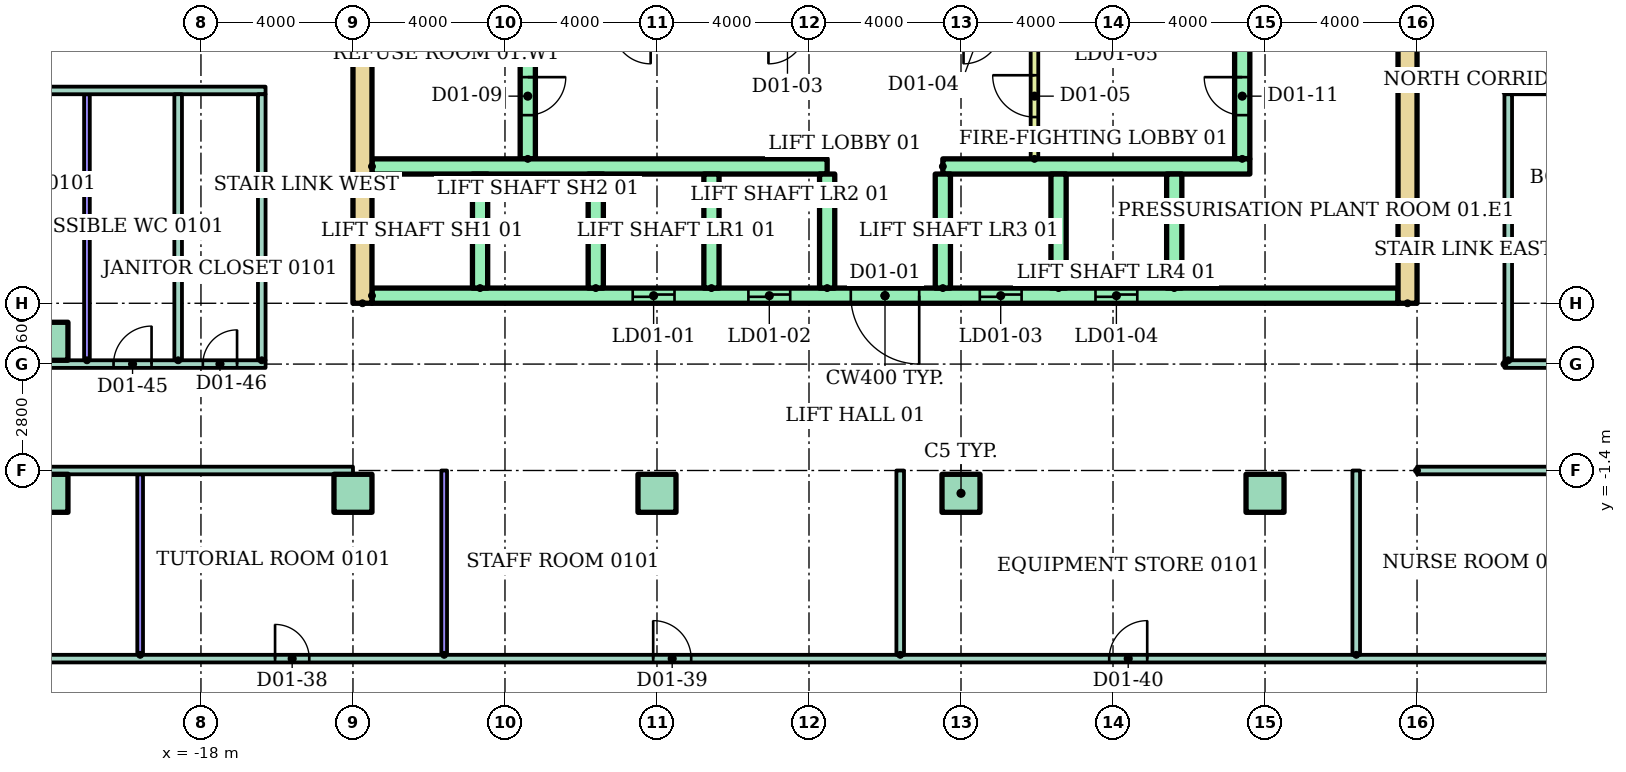
"""IFC4 building model, lengths in metres.
Left out: names, types, materials, properties, quantities, classifications, styles, units other than length and angle.
Written with IfcOpenShell. Run it as: python <this file> out.ifc"""

import sys

from ifc_helpers import new_model, si_unit, direction, frame, frame_2d, origin, origin_2d, place, context, subcontext, project, spatial, rectangle, extrude, element, fill, save


model = new_model("IFC4")
c1 = context("Model", 3, precision=1e-05, world=origin(), true_north=direction((0.0, 1.0)))
c2 = subcontext(c1, "Body", "Model", "MODEL_VIEW")
j1 = project(units=[si_unit("LENGTHUNIT", "METRE"), si_unit("PLANEANGLEUNIT", "RADIAN")], contexts=[c1])
p1 = place(None, origin())
s1 = spatial("IfcSite", under=j1, at=p1, CompositionType="ELEMENT")
p2 = place(p1, origin())
s2 = spatial("IfcBuilding", under=s1, at=p2, CompositionType="ELEMENT")
p3 = place(p2, frame((0.0, 0.0, 6.0)))
s3 = spatial("IfcBuildingStorey", under=s2, at=p3, CompositionType="ELEMENT", Elevation=6.0)
for number, where in (
    (1, (-22.0, -2.0, 0.0)),
    (2, (-14.0, -2.0, 0.0)),
    (3, (-6.0, -2.0, 0.0)),
    (4, (2.0, -2.0, 0.0)),
    (5, (10.0, -2.0, 0.0)),
    (6, (-22.0, 2.0, 0.0)),
):
    element("IfcColumn", number, at=place(p3, frame(where)), inside=s3, PredefinedType="COLUMN", context=c2, shape_type="SweptSolid", body=[
        extrude(rectangle(XDim=1.0, YDim=1.0, at=origin_2d()), origin(), (0.0, 0.0, 1.0), 4.0),
    ])
for number, where, z_axis, x_axis in (
    (7, (-13.75, 3.0, 0.0), (0.0, 0.0, 1.0), (0.0, 1.0, 0.0)),
    (8, (13.75, 3.0, 0.0), (0.0, 0.0, 1.0), (0.0, 1.0, 0.0)),
):
    element("IfcWall", number, at=place(p3, frame(where, z_axis=z_axis, x_axis=x_axis)), inside=s3, PredefinedType="SHEAR", context=c2, shape_type="SweptSolid", body=[
        extrude(rectangle(XDim=17.0, YDim=0.5, at=frame_2d((8.5, 0.0))), origin(), (0.0, 0.0, 1.0), 3.7),
    ])
p4 = place(p3, frame((-9.4, 6.8, 0.0), z_axis=(0.0, 0.0, 1.0), x_axis=(0.0, 1.0, 0.0)))
e9 = element("IfcWall", 9, at=p4, inside=s3, PredefinedType="SHEAR", context=c2, shape_type="SweptSolid", body=[
    extrude(rectangle(XDim=12.7, YDim=0.4, at=frame_2d((6.35, 0.0))), origin(), (0.0, 0.0, 1.0), 3.7),
])
p5 = place(p4, frame((1.15, 0.0, 0.0)))
e10 = element("IfcOpeningElement", 10, at=p5, cuts=e9, PredefinedType="OPENING", context=c2, shape_type="SweptSolid", body=[
    extrude(rectangle(XDim=1.0, YDim=2.1, at=frame_2d((0.5, 1.05))), frame((0.0, 0.21, 0.0), z_axis=(0.0, -1.0, 0.0), x_axis=(1.0, 0.0, 0.0)), (0.0, 0.0, 1.0), 0.42),
])
p6 = place(p4, frame((7.925, 0.0, 0.0)))
e11 = element("IfcOpeningElement", 11, at=p6, cuts=e9, PredefinedType="OPENING", context=c2, shape_type="SweptSolid", body=[
    extrude(rectangle(XDim=1.0, YDim=2.1, at=frame_2d((0.5, 1.05))), frame((0.0, 0.21, 0.0), z_axis=(0.0, -1.0, 0.0), x_axis=(1.0, 0.0, 0.0)), (0.0, 0.0, 1.0), 0.42),
])
p7 = place(p3, frame((9.4, 6.8, 0.0), z_axis=(0.0, 0.0, 1.0), x_axis=(0.0, 1.0, 0.0)))
e12 = element("IfcWall", 12, at=p7, inside=s3, PredefinedType="SHEAR", context=c2, shape_type="SweptSolid", body=[
    extrude(rectangle(XDim=12.7, YDim=0.4, at=frame_2d((6.35, 0.0))), origin(), (0.0, 0.0, 1.0), 3.7),
])
p8 = place(p7, frame((1.15, 0.0, 0.0)))
e13 = element("IfcOpeningElement", 13, at=p8, cuts=e12, PredefinedType="OPENING", context=c2, shape_type="SweptSolid", body=[
    extrude(rectangle(XDim=1.0, YDim=2.1, at=frame_2d((0.5, 1.05))), frame((0.0, 0.21, 0.0), z_axis=(0.0, -1.0, 0.0), x_axis=(1.0, 0.0, 0.0)), (0.0, 0.0, 1.0), 0.42),
])
p9 = place(p7, frame((7.925, 0.0, 0.0)))
e14 = element("IfcOpeningElement", 14, at=p9, cuts=e12, PredefinedType="OPENING", context=c2, shape_type="SweptSolid", body=[
    extrude(rectangle(XDim=1.0, YDim=2.1, at=frame_2d((0.5, 1.05))), frame((0.0, 0.21, 0.0), z_axis=(0.0, -1.0, 0.0), x_axis=(1.0, 0.0, 0.0)), (0.0, 0.0, 1.0), 0.42),
])
p10 = place(p3, frame((-13.5, 3.2, 0.0)))
e15 = element("IfcWall", 15, at=p10, inside=s3, PredefinedType="SHEAR", context=c2, shape_type="SweptSolid", body=[
    extrude(rectangle(XDim=27.0, YDim=0.4, at=frame_2d((13.5, 0.0))), origin(), (0.0, 0.0, 1.0), 3.7),
])
p11 = place(p10, frame((6.861, 0.0, 0.0)))
e16 = element("IfcOpeningElement", 16, at=p11, cuts=e15, PredefinedType="OPENING", context=c2, shape_type="SweptSolid", body=[
    extrude(rectangle(XDim=1.1, YDim=2.1, at=frame_2d((0.55, 1.05))), frame((0.0, 0.21, 0.0), z_axis=(0.0, -1.0, 0.0), x_axis=(1.0, 0.0, 0.0)), (0.0, 0.0, 1.0), 0.42),
])
p12 = place(p10, frame((9.906, 0.0, 0.0)))
e17 = element("IfcOpeningElement", 17, at=p12, cuts=e15, PredefinedType="OPENING", context=c2, shape_type="SweptSolid", body=[
    extrude(rectangle(XDim=1.1, YDim=2.1, at=frame_2d((0.55, 1.05))), frame((0.0, 0.21, 0.0), z_axis=(0.0, -1.0, 0.0), x_axis=(1.0, 0.0, 0.0)), (0.0, 0.0, 1.0), 0.42),
])
p13 = place(p10, frame((15.994, 0.0, 0.0)))
e18 = element("IfcOpeningElement", 18, at=p13, cuts=e15, PredefinedType="OPENING", context=c2, shape_type="SweptSolid", body=[
    extrude(rectangle(XDim=1.1, YDim=2.1, at=frame_2d((0.55, 1.05))), frame((0.0, 0.21, 0.0), z_axis=(0.0, -1.0, 0.0), x_axis=(1.0, 0.0, 0.0)), (0.0, 0.0, 1.0), 0.42),
])
p14 = place(p10, frame((19.039, 0.0, 0.0)))
e19 = element("IfcOpeningElement", 19, at=p14, cuts=e15, PredefinedType="OPENING", context=c2, shape_type="SweptSolid", body=[
    extrude(rectangle(XDim=1.1, YDim=2.1, at=frame_2d((0.55, 1.05))), frame((0.0, 0.21, 0.0), z_axis=(0.0, -1.0, 0.0), x_axis=(1.0, 0.0, 0.0)), (0.0, 0.0, 1.0), 0.42),
])
p15 = place(p10, frame((12.6, 0.0, 0.0)))
e20 = element("IfcOpeningElement", 20, at=p15, cuts=e15, PredefinedType="OPENING", context=c2, shape_type="SweptSolid", body=[
    extrude(rectangle(XDim=1.8, YDim=2.1, at=frame_2d((0.9, 1.05))), frame((0.0, 0.21, 0.0), z_axis=(0.0, -1.0, 0.0), x_axis=(1.0, 0.0, 0.0)), (0.0, 0.0, 1.0), 0.42),
])
p16 = place(p3, frame((-13.5, 6.6, 0.0)))
e21 = element("IfcWall", 21, at=p16, inside=s3, PredefinedType="SHEAR", context=c2, shape_type="SweptSolid", body=[
    extrude(rectangle(XDim=11.978, YDim=0.4, at=frame_2d((5.989, 0.0))), origin(), (0.0, 0.0, 1.0), 3.7),
])
p17 = place(p3, frame((1.522, 6.6, 0.0)))
e22 = element("IfcWall", 22, at=p17, inside=s3, PredefinedType="SHEAR", context=c2, shape_type="SweptSolid", body=[
    extrude(rectangle(XDim=8.078, YDim=0.4, at=frame_2d((4.039, 0.0))), origin(), (0.0, 0.0, 1.0), 3.7),
])
for number, where, z_axis, x_axis in (
    (23, (-10.656, 3.4, 0.0), (0.0, 0.0, 1.0), (0.0, 1.0, 0.0)),
    (24, (-7.611, 3.4, 0.0), (0.0, 0.0, 1.0), (0.0, 1.0, 0.0)),
    (25, (-4.567, 3.4, 0.0), (0.0, 0.0, 1.0), (0.0, 1.0, 0.0)),
    (26, (-1.522, 3.4, 0.0), (0.0, 0.0, 1.0), (0.0, 1.0, 0.0)),
    (27, (1.522, 3.4, 0.0), (0.0, 0.0, 1.0), (0.0, 1.0, 0.0)),
    (28, (4.567, 3.4, 0.0), (0.0, 0.0, 1.0), (0.0, 1.0, 0.0)),
    (29, (7.611, 3.4, 0.0), (0.0, 0.0, 1.0), (0.0, 1.0, 0.0)),
):
    element("IfcWall", number, at=place(p3, frame(where, z_axis=z_axis, x_axis=x_axis)), inside=s3, PredefinedType="SHEAR", context=c2, shape_type="SweptSolid", body=[
        extrude(rectangle(XDim=3.0, YDim=0.4, at=frame_2d((1.5, 0.0))), origin(), (0.0, 0.0, 1.0), 3.7),
    ])
p18 = place(p3, frame((3.933, 6.8, 0.0), z_axis=(0.0, 0.0, 1.0), x_axis=(0.0, 1.0, 0.0)))
e30 = element("IfcWall", 30, at=p18, inside=s3, PredefinedType="PARTITIONING", context=c2, shape_type="SweptSolid", body=[
    extrude(rectangle(XDim=3.3, YDim=0.2, at=frame_2d((1.65, 0.0))), origin(), (0.0, 0.0, 1.0), 3.7),
])
p19 = place(p18, frame((1.1, 0.0, 0.0)))
e31 = element("IfcOpeningElement", 31, at=p19, cuts=e30, PredefinedType="OPENING", context=c2, shape_type="SweptSolid", body=[
    extrude(rectangle(XDim=1.1, YDim=2.1, at=frame_2d((0.55, 1.05))), frame((0.0, 0.11, 0.0), z_axis=(0.0, -1.0, 0.0), x_axis=(1.0, 0.0, 0.0)), (0.0, 0.0, 1.0), 0.22),
])
p20 = place(p3, frame((-37.6, -6.35, 0.0)))
e32 = element("IfcWall", 32, at=p20, inside=s3, PredefinedType="PARTITIONING", context=c2, shape_type="SweptSolid", body=[
    extrude(rectangle(XDim=75.2, YDim=0.2, at=frame_2d((37.6, 0.0))), origin(), (0.0, 0.0, 1.0), 3.7),
])
p21 = place(p20, frame((4.0, 0.0, 0.0)))
e33 = element("IfcOpeningElement", 33, at=p21, cuts=e32, PredefinedType="OPENING", context=c2, shape_type="SweptSolid", body=[
    extrude(rectangle(XDim=1.0, YDim=2.1, at=frame_2d((0.5, 1.05))), frame((0.0, 0.11, 0.0), z_axis=(0.0, -1.0, 0.0), x_axis=(1.0, 0.0, 0.0)), (0.0, 0.0, 1.0), 0.22),
])
p22 = place(p20, frame((13.0, 0.0, 0.0)))
e34 = element("IfcOpeningElement", 34, at=p22, cuts=e32, PredefinedType="OPENING", context=c2, shape_type="SweptSolid", body=[
    extrude(rectangle(XDim=1.0, YDim=2.1, at=frame_2d((0.5, 1.05))), frame((0.0, 0.11, 0.0), z_axis=(0.0, -1.0, 0.0), x_axis=(1.0, 0.0, 0.0)), (0.0, 0.0, 1.0), 0.22),
])
p23 = place(p20, frame((21.55, 0.0, 0.0)))
e35 = element("IfcOpeningElement", 35, at=p23, cuts=e32, PredefinedType="OPENING", context=c2, shape_type="SweptSolid", body=[
    extrude(rectangle(XDim=0.9, YDim=2.1, at=frame_2d((0.45, 1.05))), frame((0.0, 0.11, 0.0), z_axis=(0.0, -1.0, 0.0), x_axis=(1.0, 0.0, 0.0)), (0.0, 0.0, 1.0), 0.22),
])
p24 = place(p20, frame((31.5, 0.0, 0.0)))
e36 = element("IfcOpeningElement", 36, at=p24, cuts=e32, PredefinedType="OPENING", context=c2, shape_type="SweptSolid", body=[
    extrude(rectangle(XDim=1.0, YDim=2.1, at=frame_2d((0.5, 1.05))), frame((0.0, 0.11, 0.0), z_axis=(0.0, -1.0, 0.0), x_axis=(1.0, 0.0, 0.0)), (0.0, 0.0, 1.0), 0.22),
])
p25 = place(p20, frame((43.5, 0.0, 0.0)))
e37 = element("IfcOpeningElement", 37, at=p25, cuts=e32, PredefinedType="OPENING", context=c2, shape_type="SweptSolid", body=[
    extrude(rectangle(XDim=1.0, YDim=2.1, at=frame_2d((0.5, 1.05))), frame((0.0, 0.11, 0.0), z_axis=(0.0, -1.0, 0.0), x_axis=(1.0, 0.0, 0.0)), (0.0, 0.0, 1.0), 0.22),
])
p26 = place(p20, frame((62.1, 0.0, 0.0)))
e38 = element("IfcOpeningElement", 38, at=p26, cuts=e32, PredefinedType="OPENING", context=c2, shape_type="SweptSolid", body=[
    extrude(rectangle(XDim=1.0, YDim=2.1, at=frame_2d((0.5, 1.05))), frame((0.0, 0.11, 0.0), z_axis=(0.0, -1.0, 0.0), x_axis=(1.0, 0.0, 0.0)), (0.0, 0.0, 1.0), 0.22),
])
for number, where in (
    (39, (-36.9, -1.4, 0.0)),
    (40, (14.0, -1.4, 0.0)),
):
    element("IfcWall", number, at=place(p3, frame(where)), inside=s3, PredefinedType="PARTITIONING", context=c2, shape_type="SweptSolid", body=[
        extrude(rectangle(XDim=22.9, YDim=0.2, at=frame_2d((11.45, 0.0))), origin(), (0.0, 0.0, 1.0), 3.7),
    ])
p27 = place(p3, frame((-36.9, 1.4, 0.0)))
e41 = element("IfcWall", 41, at=p27, inside=s3, PredefinedType="PARTITIONING", context=c2, shape_type="SweptSolid", body=[
    extrude(rectangle(XDim=20.6, YDim=0.2, at=frame_2d((10.3, 0.0))), origin(), (0.0, 0.0, 1.0), 3.7),
])
p28 = place(p27, frame((7.9, 0.0, 0.0)))
e42 = element("IfcOpeningElement", 42, at=p28, cuts=e41, PredefinedType="OPENING", context=c2, shape_type="SweptSolid", body=[
    extrude(rectangle(XDim=1.0, YDim=2.1, at=frame_2d((0.5, 1.05))), frame((0.0, 0.11, 0.0), z_axis=(0.0, -1.0, 0.0), x_axis=(1.0, 0.0, 0.0)), (0.0, 0.0, 1.0), 0.22),
])
p29 = place(p27, frame((12.9, 0.0, 0.0)))
e43 = element("IfcOpeningElement", 43, at=p29, cuts=e41, PredefinedType="OPENING", context=c2, shape_type="SweptSolid", body=[
    extrude(rectangle(XDim=1.0, YDim=2.1, at=frame_2d((0.5, 1.05))), frame((0.0, 0.11, 0.0), z_axis=(0.0, -1.0, 0.0), x_axis=(1.0, 0.0, 0.0)), (0.0, 0.0, 1.0), 0.22),
])
p30 = place(p27, frame((16.6, 0.0, 0.0)))
e44 = element("IfcOpeningElement", 44, at=p30, cuts=e41, PredefinedType="OPENING", context=c2, shape_type="SweptSolid", body=[
    extrude(rectangle(XDim=1.0, YDim=2.1, at=frame_2d((0.5, 1.05))), frame((0.0, 0.11, 0.0), z_axis=(0.0, -1.0, 0.0), x_axis=(1.0, 0.0, 0.0)), (0.0, 0.0, 1.0), 0.22),
])
p31 = place(p27, frame((18.95, 0.0, 0.0)))
e45 = element("IfcOpeningElement", 45, at=p31, cuts=e41, PredefinedType="OPENING", context=c2, shape_type="SweptSolid", body=[
    extrude(rectangle(XDim=0.9, YDim=2.1, at=frame_2d((0.45, 1.05))), frame((0.0, 0.11, 0.0), z_axis=(0.0, -1.0, 0.0), x_axis=(1.0, 0.0, 0.0)), (0.0, 0.0, 1.0), 0.22),
])
p32 = place(p3, frame((16.3, 1.4, 0.0)))
e46 = element("IfcWall", 46, at=p32, inside=s3, PredefinedType="PARTITIONING", context=c2, shape_type="SweptSolid", body=[
    extrude(rectangle(XDim=20.6, YDim=0.2, at=frame_2d((10.3, 0.0))), origin(), (0.0, 0.0, 1.0), 3.7),
])
p33 = place(p32, frame((2.35, 0.0, 0.0)))
e47 = element("IfcOpeningElement", 47, at=p33, cuts=e46, PredefinedType="OPENING", context=c2, shape_type="SweptSolid", body=[
    extrude(rectangle(XDim=1.0, YDim=2.1, at=frame_2d((0.5, 1.05))), frame((0.0, 0.11, 0.0), z_axis=(0.0, -1.0, 0.0), x_axis=(1.0, 0.0, 0.0)), (0.0, 0.0, 1.0), 0.22),
])
p34 = place(p32, frame((7.1, 0.0, 0.0)))
e48 = element("IfcOpeningElement", 48, at=p34, cuts=e46, PredefinedType="OPENING", context=c2, shape_type="SweptSolid", body=[
    extrude(rectangle(XDim=1.0, YDim=2.1, at=frame_2d((0.5, 1.05))), frame((0.0, 0.11, 0.0), z_axis=(0.0, -1.0, 0.0), x_axis=(1.0, 0.0, 0.0)), (0.0, 0.0, 1.0), 0.22),
])
p35 = place(p32, frame((10.8, 0.0, 0.0)))
e49 = element("IfcOpeningElement", 49, at=p35, cuts=e46, PredefinedType="OPENING", context=c2, shape_type="SweptSolid", body=[
    extrude(rectangle(XDim=1.0, YDim=2.1, at=frame_2d((0.5, 1.05))), frame((0.0, 0.11, 0.0), z_axis=(0.0, -1.0, 0.0), x_axis=(1.0, 0.0, 0.0)), (0.0, 0.0, 1.0), 0.22),
])
p36 = place(p32, frame((13.15, 0.0, 0.0)))
e50 = element("IfcOpeningElement", 50, at=p36, cuts=e46, PredefinedType="OPENING", context=c2, shape_type="SweptSolid", body=[
    extrude(rectangle(XDim=0.9, YDim=2.1, at=frame_2d((0.45, 1.05))), frame((0.0, 0.11, 0.0), z_axis=(0.0, -1.0, 0.0), x_axis=(1.0, 0.0, 0.0)), (0.0, 0.0, 1.0), 0.22),
])
for number, where in (
    (51, (-37.6, 8.6, 0.0)),
    (52, (16.3, 8.6, 0.0)),
):
    element("IfcWall", number, at=place(p3, frame(where)), inside=s3, PredefinedType="PARTITIONING", context=c2, shape_type="SweptSolid", body=[
        extrude(rectangle(XDim=21.3, YDim=0.2, at=frame_2d((10.65, 0.0))), origin(), (0.0, 0.0, 1.0), 3.7),
    ])
p37 = place(p3, frame((-21.0, 1.5, 0.0), z_axis=(0.0, 0.0, 1.0), x_axis=(0.0, 1.0, 0.0)))
e53 = element("IfcWall", 53, at=p37, inside=s3, PredefinedType="PARTITIONING", context=c2, shape_type="SweptSolid", body=[
    extrude(rectangle(XDim=7.0, YDim=0.15, at=frame_2d((3.5, 0.0))), origin(), (0.0, 0.0, 1.0), 3.7),
])
p38 = place(p3, frame((-19.6, -6.25, 0.0), z_axis=(0.0, 0.0, 1.0), x_axis=(0.0, 1.0, 0.0)))
e54 = element("IfcWall", 54, at=p38, inside=s3, PredefinedType="PARTITIONING", context=c2, shape_type="SweptSolid", body=[
    extrude(rectangle(XDim=4.75, YDim=0.15, at=frame_2d((2.375, 0.0))), origin(), (0.0, 0.0, 1.0), 3.7),
])
for number, where, z_axis, x_axis in (
    (55, (-18.6, 1.5, 0.0), (0.0, 0.0, 1.0), (0.0, 1.0, 0.0)),
    (56, (-16.4, 1.5, 0.0), (0.0, 0.0, 1.0), (0.0, 1.0, 0.0)),
):
    element("IfcWall", number, at=place(p3, frame(where, z_axis=z_axis, x_axis=x_axis)), inside=s3, PredefinedType="PARTITIONING", context=c2, shape_type="SweptSolid", body=[
        extrude(rectangle(XDim=7.0, YDim=0.2, at=frame_2d((3.5, 0.0))), origin(), (0.0, 0.0, 1.0), 3.7),
    ])
p39 = place(p3, frame((-11.6, -6.25, 0.0), z_axis=(0.0, 0.0, 1.0), x_axis=(0.0, 1.0, 0.0)))
e57 = element("IfcWall", 57, at=p39, inside=s3, PredefinedType="PARTITIONING", context=c2, shape_type="SweptSolid", body=[
    extrude(rectangle(XDim=4.85, YDim=0.15, at=frame_2d((2.425, 0.0))), origin(), (0.0, 0.0, 1.0), 3.7),
])
for number, where, z_axis, x_axis in (
    (58, (0.4, -6.25, 0.0), (0.0, 0.0, 1.0), (0.0, 1.0, 0.0)),
    (59, (12.4, -6.25, 0.0), (0.0, 0.0, 1.0), (0.0, 1.0, 0.0)),
):
    element("IfcWall", number, at=place(p3, frame(where, z_axis=z_axis, x_axis=x_axis)), inside=s3, PredefinedType="PARTITIONING", context=c2, shape_type="SweptSolid", body=[
        extrude(rectangle(XDim=4.85, YDim=0.2, at=frame_2d((2.425, 0.0))), origin(), (0.0, 0.0, 1.0), 3.7),
    ])
p40 = place(p3, frame((16.4, 1.5, 0.0), z_axis=(0.0, 0.0, 1.0), x_axis=(0.0, 1.0, 0.0)))
e60 = element("IfcWall", 60, at=p40, inside=s3, PredefinedType="PARTITIONING", context=c2, shape_type="SweptSolid", body=[
    extrude(rectangle(XDim=7.0, YDim=0.2, at=frame_2d((3.5, 0.0))), origin(), (0.0, 0.0, 1.0), 3.7),
])
p41 = place(p11, origin())
e61 = element("IfcDoor", 61, at=p41, inside=s3, OperationType="SLIDING_TO_LEFT", PredefinedType="DOOR", context=c2, shape_type="SweptSolid", body=[
    extrude(rectangle(XDim=1.1, YDim=2.1, at=frame_2d((0.55, 1.05))), frame((0.0, 0.025, 0.0), z_axis=(0.0, -1.0, 0.0), x_axis=(1.0, 0.0, 0.0)), (0.0, 0.0, 1.0), 0.05),
])
fill(e16, e61)
p42 = place(p12, origin())
e62 = element("IfcDoor", 62, at=p42, inside=s3, OperationType="SLIDING_TO_LEFT", PredefinedType="DOOR", context=c2, shape_type="SweptSolid", body=[
    extrude(rectangle(XDim=1.1, YDim=2.1, at=frame_2d((0.55, 1.05))), frame((0.0, 0.025, 0.0), z_axis=(0.0, -1.0, 0.0), x_axis=(1.0, 0.0, 0.0)), (0.0, 0.0, 1.0), 0.05),
])
fill(e17, e62)
p43 = place(p13, origin())
e63 = element("IfcDoor", 63, at=p43, inside=s3, OperationType="SLIDING_TO_LEFT", PredefinedType="DOOR", context=c2, shape_type="SweptSolid", body=[
    extrude(rectangle(XDim=1.1, YDim=2.1, at=frame_2d((0.55, 1.05))), frame((0.0, 0.025, 0.0), z_axis=(0.0, -1.0, 0.0), x_axis=(1.0, 0.0, 0.0)), (0.0, 0.0, 1.0), 0.05),
])
fill(e18, e63)
p44 = place(p14, origin())
e64 = element("IfcDoor", 64, at=p44, inside=s3, OperationType="SLIDING_TO_LEFT", PredefinedType="DOOR", context=c2, shape_type="SweptSolid", body=[
    extrude(rectangle(XDim=1.1, YDim=2.1, at=frame_2d((0.55, 1.05))), frame((0.0, 0.025, 0.0), z_axis=(0.0, -1.0, 0.0), x_axis=(1.0, 0.0, 0.0)), (0.0, 0.0, 1.0), 0.05),
])
fill(e19, e64)
p45 = place(p15, frame((1.8, 0.0, 0.0), z_axis=(0.0, 0.0, 1.0), x_axis=(-1.0, 0.0, 0.0)))
e65 = element("IfcDoor", 65, at=p45, inside=s3, OperationType="DOUBLE_DOOR_SINGLE_SWING", PredefinedType="DOOR", context=c2, shape_type="SweptSolid", body=[
    extrude(rectangle(XDim=1.8, YDim=2.1, at=frame_2d((0.9, 1.05))), frame((0.0, 0.025, 0.0), z_axis=(0.0, -1.0, 0.0), x_axis=(1.0, 0.0, 0.0)), (0.0, 0.0, 1.0), 0.05),
])
fill(e20, e65)
p46 = place(p19, origin())
e66 = element("IfcDoor", 66, at=p46, inside=s3, OperationType="SINGLE_SWING_RIGHT", PredefinedType="DOOR", context=c2, shape_type="SweptSolid", body=[
    extrude(rectangle(XDim=1.1, YDim=2.1, at=frame_2d((0.55, 1.05))), frame((0.0, 0.025, 0.0), z_axis=(0.0, -1.0, 0.0), x_axis=(1.0, 0.0, 0.0)), (0.0, 0.0, 1.0), 0.05),
])
fill(e31, e66)
p47 = place(p5, frame((1.0, 0.0, 0.0), z_axis=(0.0, 0.0, 1.0), x_axis=(-1.0, 0.0, 0.0)))
e67 = element("IfcDoor", 67, at=p47, inside=s3, OperationType="SINGLE_SWING_RIGHT", PredefinedType="DOOR", context=c2, shape_type="SweptSolid", body=[
    extrude(rectangle(XDim=1.0, YDim=2.1, at=frame_2d((0.5, 1.05))), frame((0.0, 0.025, 0.0), z_axis=(0.0, -1.0, 0.0), x_axis=(1.0, 0.0, 0.0)), (0.0, 0.0, 1.0), 0.05),
])
fill(e10, e67)
p48 = place(p8, origin())
e68 = element("IfcDoor", 68, at=p48, inside=s3, OperationType="SINGLE_SWING_RIGHT", PredefinedType="DOOR", context=c2, shape_type="SweptSolid", body=[
    extrude(rectangle(XDim=1.0, YDim=2.1, at=frame_2d((0.5, 1.05))), frame((0.0, 0.025, 0.0), z_axis=(0.0, -1.0, 0.0), x_axis=(1.0, 0.0, 0.0)), (0.0, 0.0, 1.0), 0.05),
])
fill(e13, e68)
p49 = place(p23, origin())
e69 = element("IfcDoor", 69, at=p49, inside=s3, OperationType="SINGLE_SWING_LEFT", PredefinedType="DOOR", context=c2, shape_type="SweptSolid", body=[
    extrude(rectangle(XDim=0.9, YDim=2.1, at=frame_2d((0.45, 1.05))), frame((0.0, 0.025, 0.0), z_axis=(0.0, -1.0, 0.0), x_axis=(1.0, 0.0, 0.0)), (0.0, 0.0, 1.0), 0.05),
])
fill(e35, e69)
p50 = place(p24, origin())
e70 = element("IfcDoor", 70, at=p50, inside=s3, OperationType="SINGLE_SWING_LEFT", PredefinedType="DOOR", context=c2, shape_type="SweptSolid", body=[
    extrude(rectangle(XDim=1.0, YDim=2.1, at=frame_2d((0.5, 1.05))), frame((0.0, 0.025, 0.0), z_axis=(0.0, -1.0, 0.0), x_axis=(1.0, 0.0, 0.0)), (0.0, 0.0, 1.0), 0.05),
])
fill(e36, e70)
p51 = place(p25, origin())
e71 = element("IfcDoor", 71, at=p51, inside=s3, OperationType="SINGLE_SWING_RIGHT", PredefinedType="DOOR", context=c2, shape_type="SweptSolid", body=[
    extrude(rectangle(XDim=1.0, YDim=2.1, at=frame_2d((0.5, 1.05))), frame((0.0, 0.025, 0.0), z_axis=(0.0, -1.0, 0.0), x_axis=(1.0, 0.0, 0.0)), (0.0, 0.0, 1.0), 0.05),
])
fill(e37, e71)
p52 = place(p30, origin())
e72 = element("IfcDoor", 72, at=p52, inside=s3, OperationType="SINGLE_SWING_RIGHT", PredefinedType="DOOR", context=c2, shape_type="SweptSolid", body=[
    extrude(rectangle(XDim=1.0, YDim=2.1, at=frame_2d((0.5, 1.05))), frame((0.0, 0.025, 0.0), z_axis=(0.0, -1.0, 0.0), x_axis=(1.0, 0.0, 0.0)), (0.0, 0.0, 1.0), 0.05),
])
fill(e44, e72)
p53 = place(p31, origin())
e73 = element("IfcDoor", 73, at=p53, inside=s3, OperationType="SINGLE_SWING_RIGHT", PredefinedType="DOOR", context=c2, shape_type="SweptSolid", body=[
    extrude(rectangle(XDim=0.9, YDim=2.1, at=frame_2d((0.45, 1.05))), frame((0.0, 0.025, 0.0), z_axis=(0.0, -1.0, 0.0), x_axis=(1.0, 0.0, 0.0)), (0.0, 0.0, 1.0), 0.05),
])
fill(e45, e73)
save(model, sys.argv[1])
